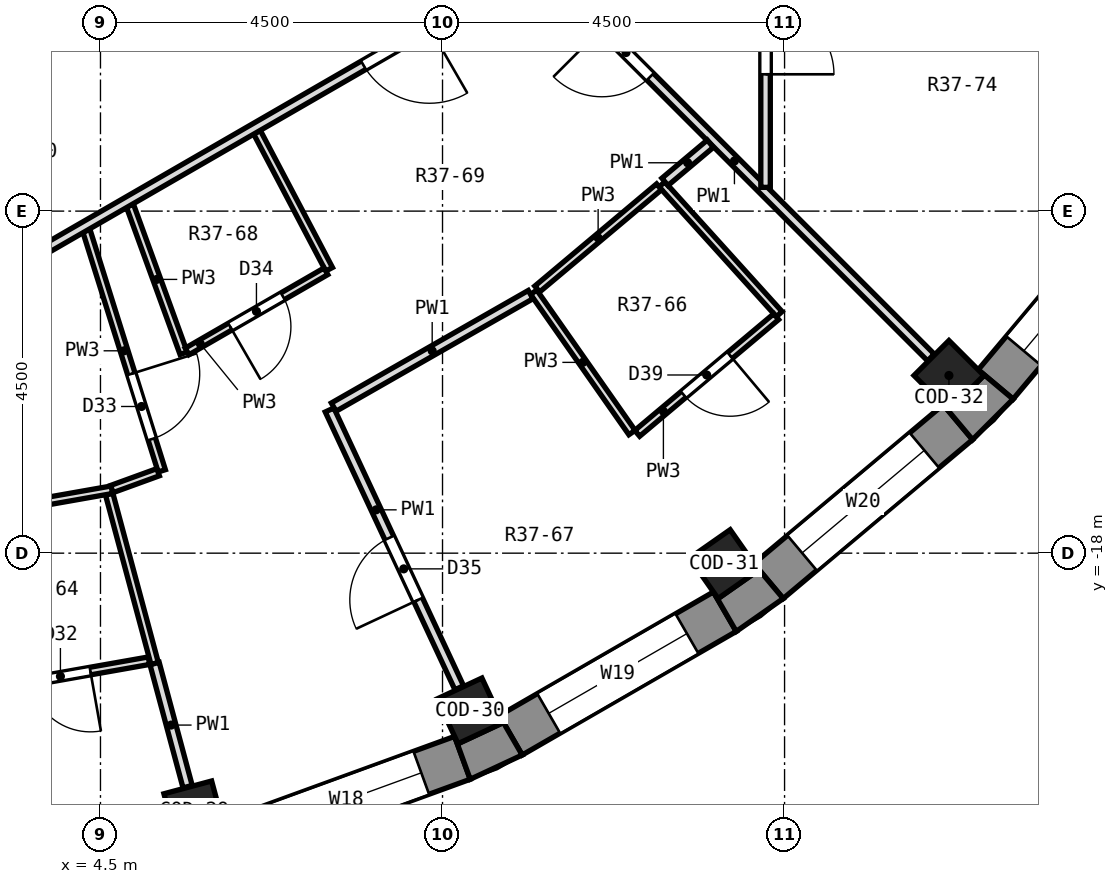
"""IFC4 building model, lengths in metres.
Left out: names, types, materials, properties, quantities, classifications, styles, units other than length and angle.
Written with IfcOpenShell. Run it as: python <this file> out.ifc"""

import sys

from ifc_helpers import new_model, si_unit, direction, frame, frame_2d, origin, origin_2d, place, context, subcontext, project, spatial, polyline, rectangle, outline, extrude, element, fill, save


model = new_model("IFC4")
c1 = context("Model", 3, precision=1e-05, world=origin(), true_north=direction((0.0, 1.0)))
c2 = subcontext(c1, "Body", "Model", "MODEL_VIEW")
j1 = project(units=[si_unit("LENGTHUNIT", "METRE"), si_unit("PLANEANGLEUNIT", "RADIAN")], contexts=[c1])
p1 = place(None, origin())
s1 = spatial("IfcSite", under=j1, at=p1, CompositionType="ELEMENT")
p2 = place(p1, origin())
s2 = spatial("IfcBuilding", under=s1, at=p2, CompositionType="ELEMENT")
p3 = place(p2, frame((0.0, 0.0, 269.3)))
s3 = spatial("IfcBuildingStorey", under=s2, at=p3, CompositionType="ELEMENT", Elevation=269.3)
for number, where, z_axis, x_axis in (
    (1, (5.733, -21.395, 0.0), (0.0, 0.0, 1.0), (0.259, -0.966, 0.0)),
    (2, (9.361, -20.075, 0.0), (0.0, 0.0, 1.0), (0.423, -0.906, 0.0)),
    (3, (12.705, -18.144, 0.0), (0.0, 0.0, 1.0), (0.574, -0.819, 0.0)),
    (4, (15.662, -15.662, 0.0), (0.0, 0.0, 1.0), (0.707, -0.707, 0.0)),
):
    element("IfcColumn", number, at=place(p3, frame(where, z_axis=z_axis, x_axis=x_axis)), inside=s3, PredefinedType="COLUMN", context=c2, shape_type="SweptSolid", body=[
        extrude(rectangle(XDim=0.65, YDim=0.65, at=origin_2d()), origin(), (0.0, 0.0, 1.0), 3.3),
    ])
p4 = place(p3, frame((6.206, -21.805, 0.0), z_axis=(0.0, 0.0, 1.0), x_axis=(0.939679383794, 0.342056509473, 0.0)))
e5 = element("IfcWall", 5, at=p4, inside=s3, PredefinedType="SOLIDWALL", context=c2, shape_type="SweptSolid", body=[
    extrude(rectangle(XDim=3.252, YDim=0.6, at=frame_2d((1.626, 0.0))), origin(), (0.0, 0.0, 1.0), 2.9),
])
p5 = place(p4, frame((0.576, 0.0, 0.9)))
e6 = element("IfcOpeningElement", 6, at=p5, cuts=e5, PredefinedType="OPENING", context=c2, shape_type="SweptSolid", body=[
    extrude(rectangle(XDim=2.1, YDim=1.8, at=frame_2d((1.05, 0.9))), frame((0.0, 0.312, 0.0), z_axis=(0.0, -1.0, 0.0), x_axis=(1.0, 0.0, 0.0)), (0.0, 0.0, 1.0), 0.624),
])
p6 = place(p3, frame((9.898, -20.396, 0.0), z_axis=(0.0, 0.0, 1.0), x_axis=(0.866016800201, 0.500014901547, 0.0)))
e7 = element("IfcWall", 7, at=p6, inside=s3, PredefinedType="SOLIDWALL", context=c2, shape_type="SweptSolid", body=[
    extrude(rectangle(XDim=3.252, YDim=0.6, at=frame_2d((1.626, 0.0))), origin(), (0.0, 0.0, 1.0), 2.9),
])
p7 = place(p6, frame((0.576, 0.0, 0.9)))
e8 = element("IfcOpeningElement", 8, at=p7, cuts=e7, PredefinedType="OPENING", context=c2, shape_type="SweptSolid", body=[
    extrude(rectangle(XDim=2.1, YDim=1.8, at=frame_2d((1.05, 0.9))), frame((0.0, 0.312, 0.0), z_axis=(0.0, -1.0, 0.0), x_axis=(1.0, 0.0, 0.0)), (0.0, 0.0, 1.0), 0.624),
])
p8 = place(p3, frame((13.29, -18.367, 0.0), z_axis=(0.0, 0.0, 1.0), x_axis=(0.766056773982, 0.64277291405, 0.0)))
e9 = element("IfcWall", 9, at=p8, inside=s3, PredefinedType="SOLIDWALL", context=c2, shape_type="SweptSolid", body=[
    extrude(rectangle(XDim=3.252, YDim=0.6, at=frame_2d((1.626, 0.0))), origin(), (0.0, 0.0, 1.0), 2.9),
])
p9 = place(p8, frame((0.576, 0.0, 0.9)))
e10 = element("IfcOpeningElement", 10, at=p9, cuts=e9, PredefinedType="OPENING", context=c2, shape_type="SweptSolid", body=[
    extrude(rectangle(XDim=2.1, YDim=1.8, at=frame_2d((1.05, 0.9))), frame((0.0, 0.312, 0.0), z_axis=(0.0, -1.0, 0.0), x_axis=(1.0, 0.0, 0.0)), (0.0, 0.0, 1.0), 0.624),
])
p10 = place(p3, frame((16.277, -15.781, 0.0), z_axis=(0.0, 0.0, 1.0), x_axis=(0.64277291405, 0.766056773982, 0.0)))
e11 = element("IfcWall", 11, at=p10, inside=s3, PredefinedType="SOLIDWALL", context=c2, shape_type="SweptSolid", body=[
    extrude(rectangle(XDim=3.252, YDim=0.6, at=frame_2d((1.626, 0.0))), origin(), (0.0, 0.0, 1.0), 2.9),
])
p11 = place(p10, frame((0.576, 0.0, 0.9)))
e12 = element("IfcOpeningElement", 12, at=p11, cuts=e11, PredefinedType="OPENING", context=c2, shape_type="SweptSolid", body=[
    extrude(rectangle(XDim=2.1, YDim=1.8, at=frame_2d((1.05, 0.9))), frame((0.0, 0.312, 0.0), z_axis=(0.0, -1.0, 0.0), x_axis=(1.0, 0.0, 0.0)), (0.0, 0.0, 1.0), 0.624),
])
p12 = place(p3, origin())
e13 = element("IfcWall", 13, at=p12, inside=s3, PredefinedType="SOLIDWALL", context=c2, shape_type="SweptSolid", body=[
    extrude(outline(polyline([(9.364, -20.975), (10.048, -20.656), (9.748, -20.136), (9.793, -20.232), (9.204, -20.507), (9.159, -20.411), (9.364, -20.975)])), origin(), (0.0, 0.0, 1.0), 2.9),
])
p13 = place(p3, origin())
e14 = element("IfcWall", 14, at=p13, inside=s3, PredefinedType="SOLIDWALL", context=c2, shape_type="SweptSolid", body=[
    extrude(outline(polyline([(12.864, -19.03), (13.482, -18.597), (13.097, -18.137), (13.157, -18.224), (12.625, -18.597), (12.564, -18.51), (12.864, -19.03)])), origin(), (0.0, 0.0, 1.0), 2.9),
])
p14 = place(p3, origin())
e15 = element("IfcWall", 15, at=p14, inside=s3, PredefinedType="SOLIDWALL", context=c2, shape_type="SweptSolid", body=[
    extrude(outline(polyline([(16.507, -15.973), (16.047, -15.588), (16.122, -15.662), (15.662, -16.122), (15.588, -16.047), (15.973, -16.507), (16.507, -15.973)])), origin(), (0.0, 0.0, 1.0), 2.9),
])
p15 = place(p3, frame((4.615, -17.222, 0.0), z_axis=(0.0, 0.0, 1.0), x_axis=(0.259222412409, -0.965817654066, 0.0)))
e16 = element("IfcWall", 16, at=p15, inside=s3, PredefinedType="PARTITIONING", context=c2, shape_type="SweptSolid", body=[
    extrude(rectangle(XDim=2.308, YDim=0.1, at=frame_2d((1.154, 0.0))), origin(), (0.0, 0.0, 1.0), 2.9),
])
p16 = place(p3, frame((5.212, -19.452, 0.0), z_axis=(0.0, 0.0, 1.0), x_axis=(0.259221341364, -0.96581794153, 0.0)))
e17 = element("IfcWall", 17, at=p16, inside=s3, PredefinedType="PARTITIONING", context=c2, shape_type="SweptSolid", body=[
    extrude(rectangle(XDim=1.677, YDim=0.125, at=frame_2d((0.838, 0.0))), origin(), (0.0, 0.0, 1.0), 2.9),
])
p17 = place(p3, frame((4.315, -13.758, 0.0), z_axis=(0.0, 0.0, 1.0), x_axis=(0.299479577404, -0.95410271078, 0.0)))
e18 = element("IfcWall", 18, at=p17, inside=s3, PredefinedType="PARTITIONING", context=c2, shape_type="SweptSolid", body=[
    extrude(rectangle(XDim=3.312, YDim=0.1, at=frame_2d((1.656, 0.0))), origin(), (0.0, 0.0, 1.0), 2.9),
])
p18 = place(p17, frame((1.974, 0.0, 0.0)))
e19 = element("IfcOpeningElement", 19, at=p18, cuts=e18, PredefinedType="OPENING", context=c2, shape_type="SweptSolid", body=[
    extrude(rectangle(XDim=0.9, YDim=2.1, at=frame_2d((0.45, 1.05))), frame((0.0, 0.062, 0.0), z_axis=(0.0, -1.0, 0.0), x_axis=(1.0, 0.0, 0.0)), (0.0, 0.0, 1.0), 0.124),
])
p19 = place(p3, frame((4.887, -13.427, 0.0), z_axis=(0.0, 0.0, 1.0), x_axis=(0.34179045994, -0.939776186916, 0.0)))
e20 = element("IfcWall", 20, at=p19, inside=s3, PredefinedType="PARTITIONING", context=c2, shape_type="SweptSolid", body=[
    extrude(rectangle(XDim=2.068, YDim=0.1, at=frame_2d((1.034, 0.0))), origin(), (0.0, 0.0, 1.0), 2.9),
])
p20 = place(p3, frame((7.514, -16.116, 0.0), z_axis=(0.0, 0.0, 1.0), x_axis=(0.422961674659, -0.90614757174, 0.0)))
e21 = element("IfcWall", 21, at=p20, inside=s3, PredefinedType="PARTITIONING", context=c2, shape_type="SweptSolid", body=[
    extrude(rectangle(XDim=4.034, YDim=0.125, at=frame_2d((2.017, 0.0))), origin(), (0.0, 0.0, 1.0), 2.9),
])
p21 = place(p20, frame((1.857, 0.0, 0.0)))
e22 = element("IfcOpeningElement", 22, at=p21, cuts=e21, PredefinedType="OPENING", context=c2, shape_type="SweptSolid", body=[
    extrude(rectangle(XDim=0.9, YDim=2.1, at=frame_2d((0.45, 1.05))), frame((0.0, 0.074, 0.0), z_axis=(0.0, -1.0, 0.0), x_axis=(1.0, 0.0, 0.0)), (0.0, 0.0, 1.0), 0.149),
])
p22 = place(p3, frame((6.559, -12.462, 0.0), z_axis=(0.0, 0.0, 1.0), x_axis=(0.465716796336, -0.884933819904, 0.0)))
e23 = element("IfcWall", 23, at=p22, inside=s3, PredefinedType="PARTITIONING", context=c2, shape_type="SweptSolid", body=[
    extrude(rectangle(XDim=2.037, YDim=0.1, at=frame_2d((1.019, 0.0))), origin(), (0.0, 0.0, 1.0), 2.9),
])
p23 = place(p3, frame((10.199, -14.567, 0.0), z_axis=(0.0, 0.0, 1.0), x_axis=(0.573796659147, -0.818997798503, 0.0)))
e24 = element("IfcWall", 24, at=p23, inside=s3, PredefinedType="PARTITIONING", context=c2, shape_type="SweptSolid", body=[
    extrude(rectangle(XDim=2.254, YDim=0.1, at=frame_2d((1.127, 0.0))), origin(), (0.0, 0.0, 1.0), 2.9),
])
p24 = place(p3, frame((11.887, -13.148, 0.0), z_axis=(0.0, 0.0, 1.0), x_axis=(0.67055763685, -0.741857436211, 0.0)))
e25 = element("IfcWall", 25, at=p24, inside=s3, PredefinedType="PARTITIONING", context=c2, shape_type="SweptSolid", body=[
    extrude(rectangle(XDim=2.301, YDim=0.1, at=frame_2d((1.15, 0.0))), origin(), (0.0, 0.0, 1.0), 2.9),
])
p25 = place(p3, frame((10.256, -10.256, 0.0), z_axis=(0.0, 0.0, 1.0), x_axis=(0.707106781187, -0.707106781187, 0.0)))
e26 = element("IfcWall", 26, at=p25, inside=s3, PredefinedType="PARTITIONING", context=c2, shape_type="SweptSolid", body=[
    extrude(rectangle(XDim=7.311, YDim=0.125, at=frame_2d((3.655, 0.0))), origin(), (0.0, 0.0, 1.0), 2.9),
])
p26 = place(p25, frame((1.188, 0.0, 0.0)))
e27 = element("IfcOpeningElement", 27, at=p26, cuts=e26, PredefinedType="OPENING", context=c2, shape_type="SweptSolid", body=[
    extrude(rectangle(XDim=0.9, YDim=2.1, at=frame_2d((0.45, 1.05))), frame((0.0, 0.074, 0.0), z_axis=(0.0, -1.0, 0.0), x_axis=(1.0, 0.0, 0.0)), (0.0, 0.0, 1.0), 0.149),
])
p27 = place(p3, frame((2.796, -19.828, 0.0), z_axis=(0.0, 0.0, 1.0), x_axis=(0.984754600233, 0.173949352742, 0.0)))
e28 = element("IfcWall", 28, at=p27, inside=s3, PredefinedType="PARTITIONING", context=c2, shape_type="SweptSolid", body=[
    extrude(rectangle(XDim=2.377, YDim=0.1, at=frame_2d((1.189, 0.0))), origin(), (0.0, 0.0, 1.0), 2.9),
])
p28 = place(p27, frame((0.795, 0.0, 0.0)))
e29 = element("IfcOpeningElement", 29, at=p28, cuts=e28, PredefinedType="OPENING", context=c2, shape_type="SweptSolid", body=[
    extrude(rectangle(XDim=0.8, YDim=2.1, at=frame_2d((0.4, 1.05))), frame((0.0, 0.062, 0.0), z_axis=(0.0, -1.0, 0.0), x_axis=(1.0, 0.0, 0.0)), (0.0, 0.0, 1.0), 0.124),
])
p29 = place(p3, frame((2.48, -17.548, 0.0), z_axis=(0.0, 0.0, 1.0), x_axis=(0.984791356236, 0.173741142745, 0.0)))
e30 = element("IfcWall", 30, at=p29, inside=s3, PredefinedType="PARTITIONING", context=c2, shape_type="SweptSolid", body=[
    extrude(rectangle(XDim=2.206, YDim=0.1, at=frame_2d((1.103, 0.0))), origin(), (0.0, 0.0, 1.0), 2.9),
])
p30 = place(p3, frame((4.65, -17.156, 0.0), z_axis=(0.0, 0.0, 1.0), x_axis=(0.939771391362, 0.341803645353, 0.0)))
e31 = element("IfcWall", 31, at=p30, inside=s3, PredefinedType="PARTITIONING", context=c2, shape_type="SweptSolid", body=[
    extrude(rectangle(XDim=0.647, YDim=0.1, at=frame_2d((0.324, 0.0))), origin(), (0.0, 0.0, 1.0), 2.9),
])
p31 = place(p3, frame((7.569, -16.079, 0.0), z_axis=(0.0, 0.0, 1.0), x_axis=(0.868243142124, 0.496138938357, 0.0)))
e32 = element("IfcWall", 32, at=p31, inside=s3, PredefinedType="PARTITIONING", context=c2, shape_type="SweptSolid", body=[
    extrude(rectangle(XDim=2.984, YDim=0.125, at=frame_2d((1.492, 0.0))), origin(), (0.0, 0.0, 1.0), 2.9),
])
p32 = place(p3, frame((5.64, -15.346, 0.0), z_axis=(0.0, 0.0, 1.0), x_axis=(0.866046731735, 0.499963057087, 0.0)))
e33 = element("IfcWall", 33, at=p32, inside=s3, PredefinedType="PARTITIONING", context=c2, shape_type="SweptSolid", body=[
    extrude(rectangle(XDim=2.108, YDim=0.1, at=frame_2d((1.054, 0.0))), origin(), (0.0, 0.0, 1.0), 2.9),
])
p33 = place(p32, frame((0.653, 0.0, 0.0)))
e34 = element("IfcOpeningElement", 34, at=p33, cuts=e33, PredefinedType="OPENING", context=c2, shape_type="SweptSolid", body=[
    extrude(rectangle(XDim=0.8, YDim=2.1, at=frame_2d((0.4, 1.05))), frame((0.0, 0.062, 0.0), z_axis=(0.0, -1.0, 0.0), x_axis=(1.0, 0.0, 0.0)), (0.0, 0.0, 1.0), 0.124),
])
p34 = place(p3, frame((3.808, -13.979, 0.0), z_axis=(0.0, 0.0, 1.0), x_axis=(0.866028642731, 0.499994389938, 0.0)))
e35 = element("IfcWall", 35, at=p34, inside=s3, PredefinedType="PARTITIONING", context=c2, shape_type="SweptSolid", body=[
    extrude(rectangle(XDim=7.383, YDim=0.125, at=frame_2d((3.691, 0.0))), origin(), (0.0, 0.0, 1.0), 2.9),
])
p35 = place(p34, frame((4.795, 0.0, 0.0)))
e36 = element("IfcOpeningElement", 36, at=p35, cuts=e35, PredefinedType="OPENING", context=c2, shape_type="SweptSolid", body=[
    extrude(rectangle(XDim=1.0, YDim=2.1, at=frame_2d((0.5, 1.05))), frame((0.0, 0.074, 0.0), z_axis=(0.0, -1.0, 0.0), x_axis=(1.0, 0.0, 0.0)), (0.0, 0.0, 1.0), 0.149),
])
p36 = place(p3, frame((3.149, -11.472, 0.0), z_axis=(0.0, 0.0, 1.0), x_axis=(0.866047390407, 0.499961916119, 0.0)))
e37 = element("IfcWall", 37, at=p36, inside=s3, PredefinedType="PARTITIONING", context=c2, shape_type="SweptSolid", body=[
    extrude(rectangle(XDim=6.031, YDim=0.125, at=frame_2d((3.015, 0.0))), origin(), (0.0, 0.0, 1.0), 2.9),
])
p37 = place(p36, frame((2.459, 0.0, 0.0)))
e38 = element("IfcOpeningElement", 38, at=p37, cuts=e37, PredefinedType="OPENING", context=c2, shape_type="SweptSolid", body=[
    extrude(rectangle(XDim=1.0, YDim=2.1, at=frame_2d((0.5, 1.05))), frame((0.0, 0.074, 0.0), z_axis=(0.0, -1.0, 0.0), x_axis=(1.0, 0.0, 0.0)), (0.0, 0.0, 1.0), 0.149),
])
p38 = place(p3, frame((11.561, -16.424, 0.0), z_axis=(0.0, 0.0, 1.0), x_axis=(0.765894211942, 0.642966605753, 0.0)))
e39 = element("IfcWall", 39, at=p38, inside=s3, PredefinedType="PARTITIONING", context=c2, shape_type="SweptSolid", body=[
    extrude(rectangle(XDim=2.387, YDim=0.1, at=frame_2d((1.194, 0.0))), origin(), (0.0, 0.0, 1.0), 2.9),
])
p39 = place(p38, frame((0.794, 0.0, 0.0)))
e40 = element("IfcOpeningElement", 40, at=p39, cuts=e39, PredefinedType="OPENING", context=c2, shape_type="SweptSolid", body=[
    extrude(rectangle(XDim=0.8, YDim=2.1, at=frame_2d((0.4, 1.05))), frame((0.0, 0.062, 0.0), z_axis=(0.0, -1.0, 0.0), x_axis=(1.0, 0.0, 0.0)), (0.0, 0.0, 1.0), 0.124),
])
p40 = place(p3, frame((10.246, -14.525, 0.0), z_axis=(0.0, 0.0, 1.0), x_axis=(0.766084035901, 0.642740421895, 0.0)))
e41 = element("IfcWall", 41, at=p40, inside=s3, PredefinedType="PARTITIONING", context=c2, shape_type="SweptSolid", body=[
    extrude(rectangle(XDim=2.092, YDim=0.1, at=frame_2d((1.046, 0.0))), origin(), (0.0, 0.0, 1.0), 2.9),
])
p41 = place(p3, frame((11.926, -13.115, 0.0), z_axis=(0.0, 0.0, 1.0), x_axis=(0.765365590348, 0.643595768407, 0.0)))
e42 = element("IfcWall", 42, at=p41, inside=s3, PredefinedType="PARTITIONING", context=c2, shape_type="SweptSolid", body=[
    extrude(rectangle(XDim=0.78, YDim=0.125, at=frame_2d((0.39, 0.0))), origin(), (0.0, 0.0, 1.0), 2.9),
])
p42 = place(p3, frame((13.25, -13.188, 0.0), z_axis=(0.0, 0.0, 1.0), x_axis=(0.0, 1.0, 0.0)))
e43 = element("IfcWall", 43, at=p42, inside=s3, PredefinedType="PARTITIONING", context=c2, shape_type="SweptSolid", body=[
    extrude(rectangle(XDim=3.938, YDim=0.125, at=frame_2d((1.969, 0.0))), origin(), (0.0, 0.0, 1.0), 2.9),
])
p43 = place(p42, frame((1.488, 0.0, 0.0)))
e44 = element("IfcOpeningElement", 44, at=p43, cuts=e43, PredefinedType="OPENING", context=c2, shape_type="SweptSolid", body=[
    extrude(rectangle(XDim=0.9, YDim=2.1, at=frame_2d((0.45, 1.05))), frame((0.0, 0.074, 0.0), z_axis=(0.0, -1.0, 0.0), x_axis=(1.0, 0.0, 0.0)), (0.0, 0.0, 1.0), 0.149),
])
p44 = place(p5, origin())
e45 = element("IfcWindow", 45, at=p44, inside=s3, PartitioningType="SINGLE_PANEL", PredefinedType="WINDOW", context=c2, shape_type="SweptSolid", body=[
    extrude(rectangle(XDim=2.1, YDim=1.8, at=frame_2d((1.05, 0.9))), frame((0.0, 0.18, 0.0), z_axis=(0.0, -1.0, 0.0), x_axis=(1.0, 0.0, 0.0)), (0.0, 0.0, 1.0), 0.06),
])
fill(e6, e45)
p45 = place(p7, origin())
e46 = element("IfcWindow", 46, at=p45, inside=s3, PartitioningType="SINGLE_PANEL", PredefinedType="WINDOW", context=c2, shape_type="SweptSolid", body=[
    extrude(rectangle(XDim=2.1, YDim=1.8, at=frame_2d((1.05, 0.9))), frame((0.0, 0.18, 0.0), z_axis=(0.0, -1.0, 0.0), x_axis=(1.0, 0.0, 0.0)), (0.0, 0.0, 1.0), 0.06),
])
fill(e8, e46)
p46 = place(p9, origin())
e47 = element("IfcWindow", 47, at=p46, inside=s3, PartitioningType="SINGLE_PANEL", PredefinedType="WINDOW", context=c2, shape_type="SweptSolid", body=[
    extrude(rectangle(XDim=2.1, YDim=1.8, at=frame_2d((1.05, 0.9))), frame((0.0, 0.18, 0.0), z_axis=(0.0, -1.0, 0.0), x_axis=(1.0, 0.0, 0.0)), (0.0, 0.0, 1.0), 0.06),
])
fill(e10, e47)
p47 = place(p11, origin())
e48 = element("IfcWindow", 48, at=p47, inside=s3, PartitioningType="SINGLE_PANEL", PredefinedType="WINDOW", context=c2, shape_type="SweptSolid", body=[
    extrude(rectangle(XDim=2.1, YDim=1.8, at=frame_2d((1.05, 0.9))), frame((0.0, 0.18, 0.0), z_axis=(0.0, -1.0, 0.0), x_axis=(1.0, 0.0, 0.0)), (0.0, 0.0, 1.0), 0.06),
])
fill(e12, e48)
p48 = place(p28, frame((0.8, 0.0, 0.0), z_axis=(0.0, 0.0, 1.0), x_axis=(-1.0, 0.0, 0.0)))
e49 = element("IfcDoor", 49, at=p48, inside=s3, OperationType="SINGLE_SWING_LEFT", PredefinedType="DOOR", context=c2, shape_type="SweptSolid", body=[
    extrude(rectangle(XDim=0.8, YDim=2.1, at=frame_2d((0.4, 1.05))), frame((0.0, 0.025, 0.0), z_axis=(0.0, -1.0, 0.0), x_axis=(1.0, 0.0, 0.0)), (0.0, 0.0, 1.0), 0.05),
])
fill(e29, e49)
p49 = place(p18, origin())
e50 = element("IfcDoor", 50, at=p49, inside=s3, OperationType="SINGLE_SWING_LEFT", PredefinedType="DOOR", context=c2, shape_type="SweptSolid", body=[
    extrude(rectangle(XDim=0.9, YDim=2.1, at=frame_2d((0.45, 1.05))), frame((0.0, 0.025, 0.0), z_axis=(0.0, -1.0, 0.0), x_axis=(1.0, 0.0, 0.0)), (0.0, 0.0, 1.0), 0.05),
])
fill(e19, e50)
p50 = place(p33, frame((0.8, 0.0, 0.0), z_axis=(0.0, 0.0, 1.0), x_axis=(-1.0, 0.0, 0.0)))
e51 = element("IfcDoor", 51, at=p50, inside=s3, OperationType="SINGLE_SWING_RIGHT", PredefinedType="DOOR", context=c2, shape_type="SweptSolid", body=[
    extrude(rectangle(XDim=0.8, YDim=2.1, at=frame_2d((0.4, 1.05))), frame((0.0, 0.025, 0.0), z_axis=(0.0, -1.0, 0.0), x_axis=(1.0, 0.0, 0.0)), (0.0, 0.0, 1.0), 0.05),
])
fill(e34, e51)
p51 = place(p21, frame((0.9, 0.0, 0.0), z_axis=(0.0, 0.0, 1.0), x_axis=(-1.0, 0.0, 0.0)))
e52 = element("IfcDoor", 52, at=p51, inside=s3, OperationType="SINGLE_SWING_LEFT", PredefinedType="DOOR", context=c2, shape_type="SweptSolid", body=[
    extrude(rectangle(XDim=0.9, YDim=2.1, at=frame_2d((0.45, 1.05))), frame((0.0, 0.025, 0.0), z_axis=(0.0, -1.0, 0.0), x_axis=(1.0, 0.0, 0.0)), (0.0, 0.0, 1.0), 0.05),
])
fill(e22, e52)
p52 = place(p35, frame((1.0, 0.0, 0.0), z_axis=(0.0, 0.0, 1.0), x_axis=(-1.0, 0.0, 0.0)))
e53 = element("IfcDoor", 53, at=p52, inside=s3, OperationType="SINGLE_SWING_LEFT", PredefinedType="DOOR", context=c2, shape_type="SweptSolid", body=[
    extrude(rectangle(XDim=1.0, YDim=2.1, at=frame_2d((0.5, 1.05))), frame((0.0, 0.025, 0.0), z_axis=(0.0, -1.0, 0.0), x_axis=(1.0, 0.0, 0.0)), (0.0, 0.0, 1.0), 0.05),
])
fill(e36, e53)
p53 = place(p39, frame((0.8, 0.0, 0.0), z_axis=(0.0, 0.0, 1.0), x_axis=(-1.0, 0.0, 0.0)))
e54 = element("IfcDoor", 54, at=p53, inside=s3, OperationType="SINGLE_SWING_LEFT", PredefinedType="DOOR", context=c2, shape_type="SweptSolid", body=[
    extrude(rectangle(XDim=0.8, YDim=2.1, at=frame_2d((0.4, 1.05))), frame((0.0, 0.025, 0.0), z_axis=(0.0, -1.0, 0.0), x_axis=(1.0, 0.0, 0.0)), (0.0, 0.0, 1.0), 0.05),
])
fill(e40, e54)
p54 = place(p26, frame((0.9, 0.0, 0.0), z_axis=(0.0, 0.0, 1.0), x_axis=(-1.0, 0.0, 0.0)))
e55 = element("IfcDoor", 55, at=p54, inside=s3, OperationType="SINGLE_SWING_RIGHT", PredefinedType="DOOR", context=c2, shape_type="SweptSolid", body=[
    extrude(rectangle(XDim=0.9, YDim=2.1, at=frame_2d((0.45, 1.05))), frame((0.0, 0.025, 0.0), z_axis=(0.0, -1.0, 0.0), x_axis=(1.0, 0.0, 0.0)), (0.0, 0.0, 1.0), 0.05),
])
fill(e27, e55)
p55 = place(p43, frame((0.9, 0.0, 0.0), z_axis=(0.0, 0.0, 1.0), x_axis=(-1.0, 0.0, 0.0)))
e56 = element("IfcDoor", 56, at=p55, inside=s3, OperationType="SINGLE_SWING_RIGHT", PredefinedType="DOOR", context=c2, shape_type="SweptSolid", body=[
    extrude(rectangle(XDim=0.9, YDim=2.1, at=frame_2d((0.45, 1.05))), frame((0.0, 0.025, 0.0), z_axis=(0.0, -1.0, 0.0), x_axis=(1.0, 0.0, 0.0)), (0.0, 0.0, 1.0), 0.05),
])
fill(e44, e56)
save(model, sys.argv[1])
